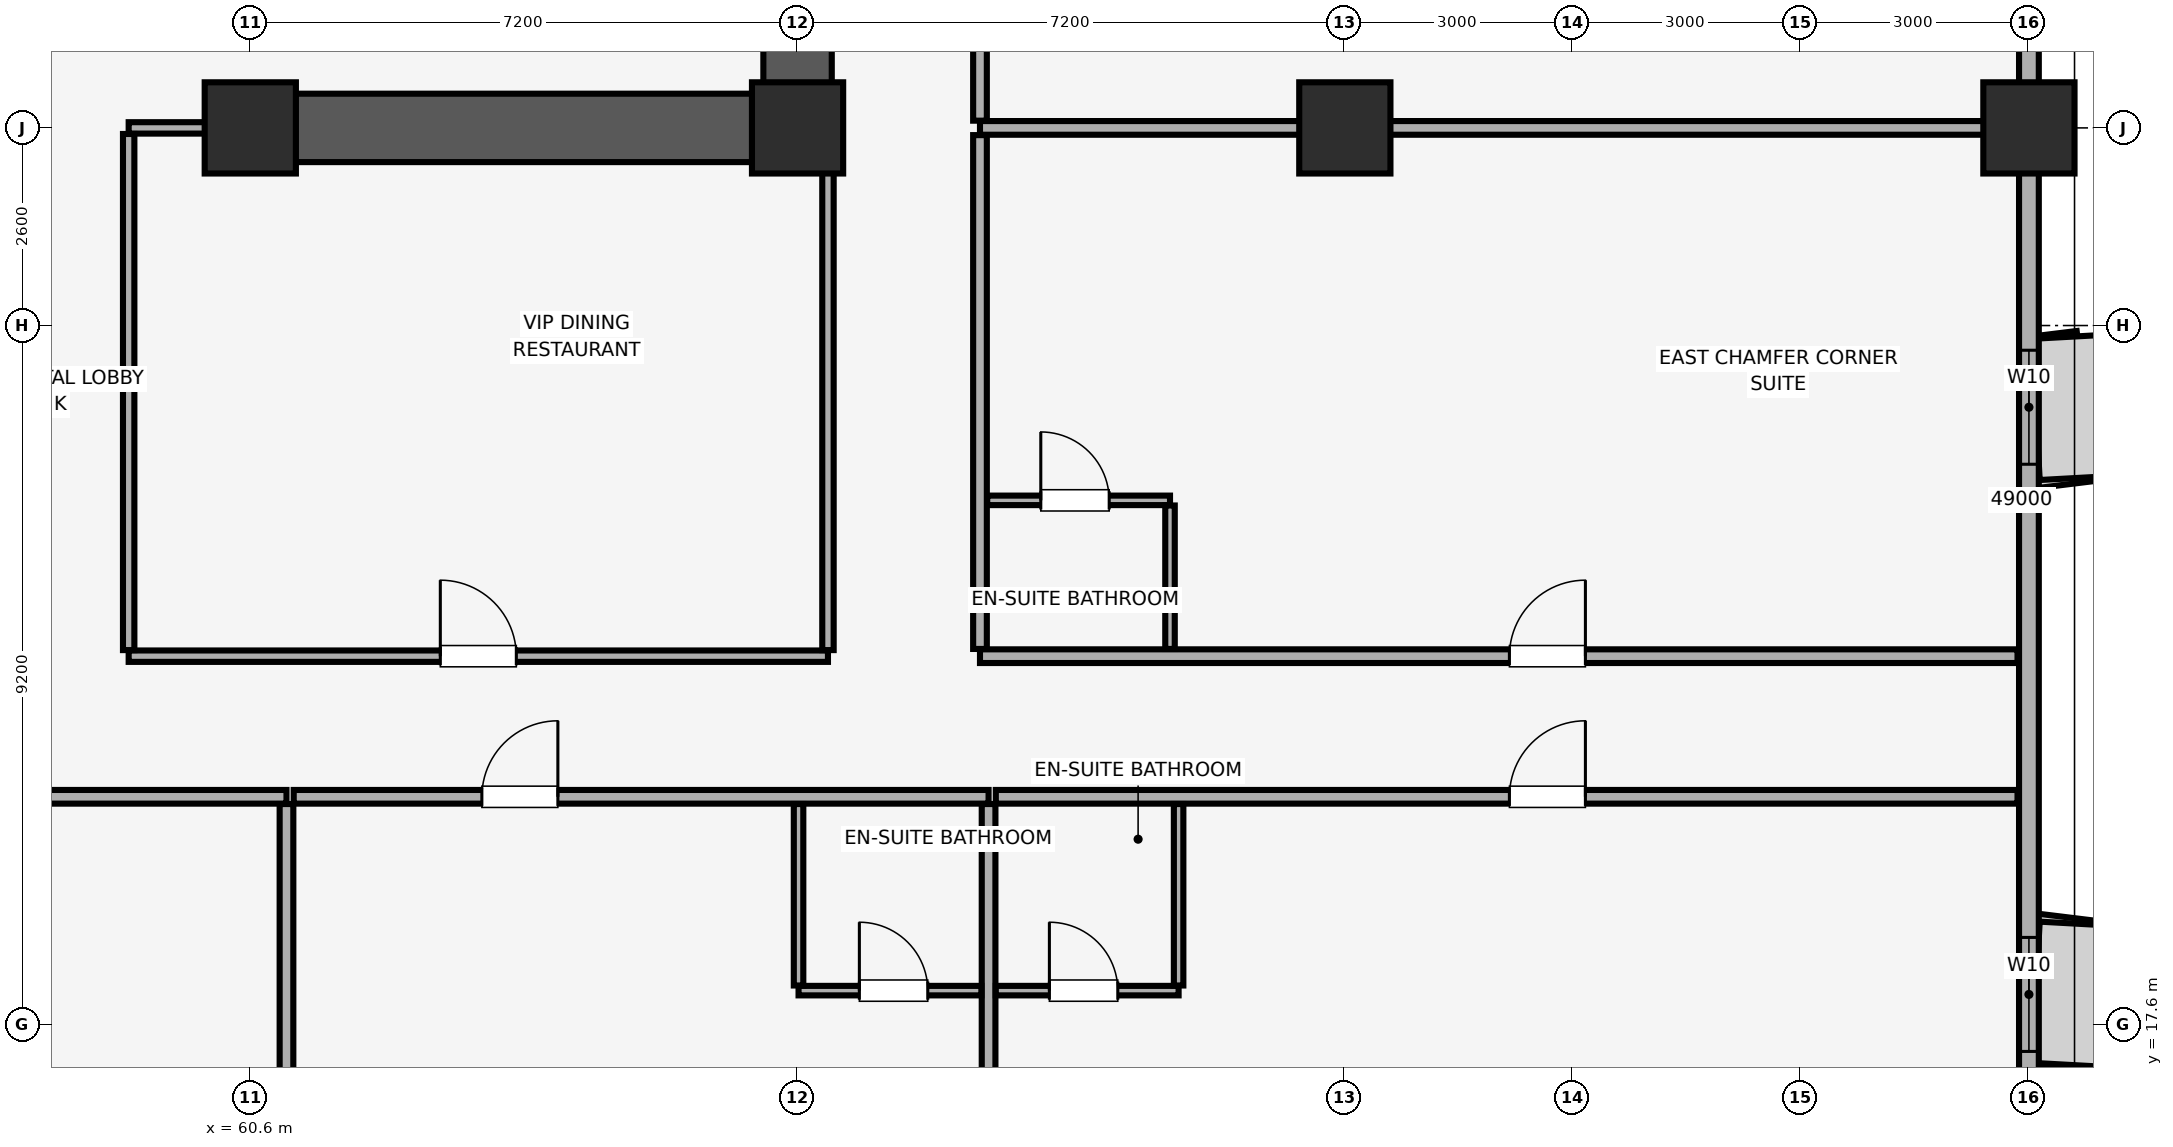
"""IFC4 building model, lengths in metres.
Left out: names, types, materials, properties, quantities, classifications, styles, units other than length and angle.
Written with IfcOpenShell. Run it as: python <this file> out.ifc"""

import sys

from ifc_helpers import new_model, si_unit, direction, frame, frame_2d, origin, origin_2d, place, context, subcontext, project, spatial, rectangle, extrude, element, fill, save


model = new_model("IFC4")
c1 = context("Model", 3, precision=1e-05, world=origin(), true_north=direction((0.0, 1.0)))
c2 = subcontext(c1, "Body", "Model", "MODEL_VIEW")
j1 = project(units=[si_unit("LENGTHUNIT", "METRE"), si_unit("PLANEANGLEUNIT", "RADIAN")], contexts=[c1])
p1 = place(None, origin())
s1 = spatial("IfcSite", under=j1, at=p1, CompositionType="ELEMENT")
p2 = place(p1, origin())
s2 = spatial("IfcBuilding", under=s1, at=p2, CompositionType="ELEMENT")
p3 = place(p2, frame((0.0, 0.0, 93.05)))
s3 = spatial("IfcBuildingStorey", under=s2, at=p3, CompositionType="ELEMENT", Elevation=93.05)
for number, where, z_axis, x_axis in (
    (1, (84.0, 29.4, 0.0), (0.0, 0.0, 1.0), (1.0, 0.0, 0.0)),
    (2, (60.6, 29.4, 0.0), (0.0, 0.0, 1.0), (1.0, 0.0, 0.0)),
    (3, (67.8, 29.4, 0.0), (0.0, 0.0, 1.0), (1.0, 0.0, 0.0)),
    (4, (75.0, 29.4, 0.0), (0.0, 0.0, 1.0), (1.0, 0.0, 0.0)),
):
    element("IfcColumn", number, at=place(p3, frame(where, z_axis=z_axis, x_axis=x_axis)), inside=s3, PredefinedType="COLUMN", context=c2, shape_type="SweptSolid", body=[
        extrude(rectangle(XDim=1.2, YDim=1.2, at=origin_2d()), origin(), (0.0, 0.0, 1.0), 3.51),
    ])
p4 = place(p3, frame((84.0, 4.2, 0.0), z_axis=(0.0, 0.0, 1.0), x_axis=(0.0, 1.0, 0.0)))
e5 = element("IfcWall", 5, at=p4, inside=s3, PredefinedType="SOLIDWALL", context=c2, shape_type="SweptSolid", body=[
    extrude(rectangle(XDim=40.6, YDim=0.26, at=frame_2d((20.3, 0.0))), origin(), (0.0, 0.0, 1.0), 2.56),
])
p5 = place(p4, frame((6.05, 0.0, 0.85)))
e6 = element("IfcOpeningElement", 6, at=p5, cuts=e5, PredefinedType="OPENING", context=c2, shape_type="SweptSolid", body=[
    extrude(rectangle(XDim=1.5, YDim=1.4, at=frame_2d((0.75, 0.7))), frame((0.0, 0.14, 0.0), z_axis=(0.0, -1.0, 0.0), x_axis=(1.0, 0.0, 0.0)), (0.0, 0.0, 1.0), 0.28),
])
p6 = place(p4, frame((13.05, 0.0, 0.85)))
e7 = element("IfcOpeningElement", 7, at=p6, cuts=e5, PredefinedType="OPENING", context=c2, shape_type="SweptSolid", body=[
    extrude(rectangle(XDim=1.5, YDim=1.4, at=frame_2d((0.75, 0.7))), frame((0.0, 0.14, 0.0), z_axis=(0.0, -1.0, 0.0), x_axis=(1.0, 0.0, 0.0)), (0.0, 0.0, 1.0), 0.28),
])
p7 = place(p4, frame((20.775, 0.0, 0.85)))
e8 = element("IfcOpeningElement", 8, at=p7, cuts=e5, PredefinedType="OPENING", context=c2, shape_type="SweptSolid", body=[
    extrude(rectangle(XDim=1.5, YDim=1.4, at=frame_2d((0.75, 0.7))), frame((0.0, 0.14, 0.0), z_axis=(0.0, -1.0, 0.0), x_axis=(1.0, 0.0, 0.0)), (0.0, 0.0, 1.0), 0.28),
])
p8 = place(p4, frame((27.165, 0.0, 0.85)))
e9 = element("IfcOpeningElement", 9, at=p8, cuts=e5, PredefinedType="OPENING", context=c2, shape_type="SweptSolid", body=[
    extrude(rectangle(XDim=1.5, YDim=1.4, at=frame_2d((0.75, 0.7))), frame((0.0, 0.14, 0.0), z_axis=(0.0, -1.0, 0.0), x_axis=(1.0, 0.0, 0.0)), (0.0, 0.0, 1.0), 0.28),
])
p9 = place(p4, frame((31.935, 0.0, 0.85)))
e10 = element("IfcOpeningElement", 10, at=p9, cuts=e5, PredefinedType="OPENING", context=c2, shape_type="SweptSolid", body=[
    extrude(rectangle(XDim=1.5, YDim=1.4, at=frame_2d((0.75, 0.7))), frame((0.0, 0.14, 0.0), z_axis=(0.0, -1.0, 0.0), x_axis=(1.0, 0.0, 0.0)), (0.0, 0.0, 1.0), 0.28),
])
p10 = place(p4, frame((37.365, 0.0, 0.85)))
e11 = element("IfcOpeningElement", 11, at=p10, cuts=e5, PredefinedType="OPENING", context=c2, shape_type="SweptSolid", body=[
    extrude(rectangle(XDim=1.5, YDim=1.4, at=frame_2d((0.75, 0.7))), frame((0.0, 0.14, 0.0), z_axis=(0.0, -1.0, 0.0), x_axis=(1.0, 0.0, 0.0)), (0.0, 0.0, 1.0), 0.28),
])
p11 = place(p3, frame((67.8, 29.4, 0.0), z_axis=(0.0, 0.0, 1.0), x_axis=(0.0, 1.0, 0.0)))
e12 = element("IfcWall", 12, at=p11, inside=s3, PredefinedType="SHEAR", context=c2, shape_type="SweptSolid", body=[
    extrude(rectangle(XDim=19.2, YDim=0.9, at=frame_2d((9.6, 0.0))), origin(), (0.0, 0.0, 1.0), 3.51),
])
p12 = place(p3, frame((60.4, 29.4, 0.0), z_axis=(0.0, 0.0, 1.0), x_axis=(1.0, 0.0, 0.0)))
e13 = element("IfcWall", 13, at=p12, inside=s3, PredefinedType="SHEAR", context=c2, shape_type="SweptSolid", body=[
    extrude(rectangle(XDim=6.945, YDim=0.9, at=frame_2d((3.473, 0.0))), origin(), (0.0, 0.0, 1.0), 3.51),
])
p13 = place(p3, frame((51.733, 20.6, 0.0), z_axis=(0.0, 0.0, 1.0), x_axis=(1.0, 0.0, 0.0)))
e14 = element("IfcWall", 14, at=p13, inside=s3, PredefinedType="PARTITIONING", context=c2, shape_type="SweptSolid", body=[
    extrude(rectangle(XDim=9.343, YDim=0.18, at=frame_2d((4.671, 0.0))), origin(), (0.0, 0.0, 1.0), 3.51),
])
p14 = place(p13, frame((5.196, 0.0, 0.0)))
e15 = element("IfcOpeningElement", 15, at=p14, cuts=e14, PredefinedType="OPENING", context=c2, shape_type="SweptSolid", body=[
    extrude(rectangle(XDim=1.0, YDim=2.15, at=frame_2d((0.5, 1.075))), frame((0.0, 0.1, 0.0), z_axis=(0.0, -1.0, 0.0), x_axis=(1.0, 0.0, 0.0)), (0.0, 0.0, 1.0), 0.2),
])
p15 = place(p3, frame((61.076, 0.15, 0.0), z_axis=(0.0, 0.0, 1.0), x_axis=(0.0, 1.0, 0.0)))
e16 = element("IfcWall", 16, at=p15, inside=s3, PredefinedType="PARTITIONING", context=c2, shape_type="SweptSolid", body=[
    extrude(rectangle(XDim=20.355, YDim=0.18, at=frame_2d((10.177, 0.0))), origin(), (0.0, 0.0, 1.0), 3.51),
])
p16 = place(p3, frame((61.171, 20.6, 0.0), z_axis=(0.0, 0.0, 1.0), x_axis=(1.0, 0.0, 0.0)))
e17 = element("IfcWall", 17, at=p16, inside=s3, PredefinedType="PARTITIONING", context=c2, shape_type="SweptSolid", body=[
    extrude(rectangle(XDim=9.142, YDim=0.18, at=frame_2d((4.571, 0.0))), origin(), (0.0, 0.0, 1.0), 3.51),
])
p17 = place(p16, frame((2.475, 0.0, 0.0)))
e18 = element("IfcOpeningElement", 18, at=p17, cuts=e17, PredefinedType="OPENING", context=c2, shape_type="SweptSolid", body=[
    extrude(rectangle(XDim=1.0, YDim=2.15, at=frame_2d((0.5, 1.075))), frame((0.0, 0.1, 0.0), z_axis=(0.0, -1.0, 0.0), x_axis=(1.0, 0.0, 0.0)), (0.0, 0.0, 1.0), 0.2),
])
p18 = place(p3, frame((70.313, 0.15, 0.0), z_axis=(0.0, 0.0, 1.0), x_axis=(0.0, 1.0, 0.0)))
e19 = element("IfcWall", 19, at=p18, inside=s3, PredefinedType="PARTITIONING", context=c2, shape_type="SweptSolid", body=[
    extrude(rectangle(XDim=20.355, YDim=0.18, at=frame_2d((10.177, 0.0))), origin(), (0.0, 0.0, 1.0), 3.51),
])
p19 = place(p3, frame((67.813, 18.05, 0.0), z_axis=(0.0, 0.0, 1.0), x_axis=(1.0, 0.0, 0.0)))
e20 = element("IfcWall", 20, at=p19, inside=s3, PredefinedType="PARTITIONING", context=c2, shape_type="SweptSolid", body=[
    extrude(rectangle(XDim=2.405, YDim=0.125, at=frame_2d((1.203, 0.0))), origin(), (0.0, 0.0, 1.0), 3.51),
])
p20 = place(p19, frame((0.8, 0.0, 0.0)))
e21 = element("IfcOpeningElement", 21, at=p20, cuts=e20, PredefinedType="OPENING", context=c2, shape_type="SweptSolid", body=[
    extrude(rectangle(XDim=0.9, YDim=2.1, at=frame_2d((0.45, 1.05))), frame((0.0, 0.073, 0.0), z_axis=(0.0, -1.0, 0.0), x_axis=(1.0, 0.0, 0.0)), (0.0, 0.0, 1.0), 0.145),
])
p21 = place(p3, frame((67.813, 18.117, 0.0), z_axis=(0.0, 0.0, 1.0), x_axis=(0.0, 1.0, 0.0)))
e22 = element("IfcWall", 22, at=p21, inside=s3, PredefinedType="PARTITIONING", context=c2, shape_type="SweptSolid", body=[
    extrude(rectangle(XDim=2.387, YDim=0.125, at=frame_2d((1.194, 0.0))), origin(), (0.0, 0.0, 1.0), 2.977),
])
p22 = place(p3, frame((70.408, 20.6, 0.0), z_axis=(0.0, 0.0, 1.0), x_axis=(1.0, 0.0, 0.0)))
e23 = element("IfcWall", 23, at=p22, inside=s3, PredefinedType="PARTITIONING", context=c2, shape_type="SweptSolid", body=[
    extrude(rectangle(XDim=13.442, YDim=0.18, at=frame_2d((6.721, 0.0))), origin(), (0.0, 0.0, 1.0), 3.51),
])
p23 = place(p22, frame((6.757, 0.0, 0.0)))
e24 = element("IfcOpeningElement", 24, at=p23, cuts=e23, PredefinedType="OPENING", context=c2, shape_type="SweptSolid", body=[
    extrude(rectangle(XDim=1.0, YDim=2.15, at=frame_2d((0.5, 1.075))), frame((0.0, 0.1, 0.0), z_axis=(0.0, -1.0, 0.0), x_axis=(1.0, 0.0, 0.0)), (0.0, 0.0, 1.0), 0.2),
])
p24 = place(p3, frame((70.408, 18.05, 0.0), z_axis=(0.0, 0.0, 1.0), x_axis=(1.0, 0.0, 0.0)))
e25 = element("IfcWall", 25, at=p24, inside=s3, PredefinedType="PARTITIONING", context=c2, shape_type="SweptSolid", body=[
    extrude(rectangle(XDim=2.405, YDim=0.125, at=frame_2d((1.202, 0.0))), origin(), (0.0, 0.0, 1.0), 3.51),
])
p25 = place(p24, frame((0.705, 0.0, 0.0)))
e26 = element("IfcOpeningElement", 26, at=p25, cuts=e25, PredefinedType="OPENING", context=c2, shape_type="SweptSolid", body=[
    extrude(rectangle(XDim=0.9, YDim=2.1, at=frame_2d((0.45, 1.05))), frame((0.0, 0.073, 0.0), z_axis=(0.0, -1.0, 0.0), x_axis=(1.0, 0.0, 0.0)), (0.0, 0.0, 1.0), 0.145),
])
p26 = place(p3, frame((72.813, 18.117, 0.0), z_axis=(0.0, 0.0, 1.0), x_axis=(0.0, 1.0, 0.0)))
e27 = element("IfcWall", 27, at=p26, inside=s3, PredefinedType="PARTITIONING", context=c2, shape_type="SweptSolid", body=[
    extrude(rectangle(XDim=2.387, YDim=0.125, at=frame_2d((1.194, 0.0))), origin(), (0.0, 0.0, 1.0), 3.51),
])
p27 = place(p3, frame((59.0, 22.45, 0.0), z_axis=(0.0, 0.0, 1.0), x_axis=(1.0, 0.0, 0.0)))
e28 = element("IfcWall", 28, at=p27, inside=s3, PredefinedType="PARTITIONING", context=c2, shape_type="SweptSolid", body=[
    extrude(rectangle(XDim=9.2, YDim=0.15, at=frame_2d((4.6, 0.0))), origin(), (0.0, 0.0, 1.0), 3.51),
])
p28 = place(p27, frame((4.1, 0.0, 0.0)))
e29 = element("IfcOpeningElement", 29, at=p28, cuts=e28, PredefinedType="OPENING", context=c2, shape_type="SweptSolid", body=[
    extrude(rectangle(XDim=1.0, YDim=2.15, at=frame_2d((0.5, 1.075))), frame((0.0, 0.085, 0.0), z_axis=(0.0, -1.0, 0.0), x_axis=(1.0, 0.0, 0.0)), (0.0, 0.0, 1.0), 0.17),
])
p29 = place(p3, frame((59.0, 29.4, 0.0), z_axis=(0.0, 0.0, 1.0), x_axis=(1.0, 0.0, 0.0)))
e30 = element("IfcWall", 30, at=p29, inside=s3, PredefinedType="PARTITIONING", context=c2, shape_type="SweptSolid", body=[
    extrude(rectangle(XDim=1.39, YDim=0.15, at=frame_2d((0.695, 0.0))), origin(), (0.0, 0.0, 1.0), 2.41),
])
p30 = place(p3, frame((59.0, 22.53, 0.0), z_axis=(0.0, 0.0, 1.0), x_axis=(0.0, 1.0, 0.0)))
e31 = element("IfcWall", 31, at=p30, inside=s3, PredefinedType="PARTITIONING", context=c2, shape_type="SweptSolid", body=[
    extrude(rectangle(XDim=6.79, YDim=0.15, at=frame_2d((3.395, 0.0))), origin(), (0.0, 0.0, 1.0), 3.51),
])
p31 = place(p3, frame((68.2, 22.53, 0.0), z_axis=(0.0, 0.0, 1.0), x_axis=(0.0, 1.0, 0.0)))
e32 = element("IfcWall", 32, at=p31, inside=s3, PredefinedType="PARTITIONING", context=c2, shape_type="SweptSolid", body=[
    extrude(rectangle(XDim=6.86, YDim=0.15, at=frame_2d((3.43, 0.0))), origin(), (0.0, 0.0, 1.0), 3.51),
])
p32 = place(p3, frame((70.2, 22.45, 0.0), z_axis=(0.0, 0.0, 1.0), x_axis=(1.0, 0.0, 0.0)))
e33 = element("IfcWall", 33, at=p32, inside=s3, PredefinedType="PARTITIONING", context=c2, shape_type="SweptSolid", body=[
    extrude(rectangle(XDim=13.65, YDim=0.18, at=frame_2d((6.825, 0.0))), origin(), (0.0, 0.0, 1.0), 3.51),
])
p33 = place(p32, frame((6.965, 0.0, 0.0)))
e34 = element("IfcOpeningElement", 34, at=p33, cuts=e33, PredefinedType="OPENING", context=c2, shape_type="SweptSolid", body=[
    extrude(rectangle(XDim=1.0, YDim=2.15, at=frame_2d((0.5, 1.075))), frame((0.0, 0.1, 0.0), z_axis=(0.0, -1.0, 0.0), x_axis=(1.0, 0.0, 0.0)), (0.0, 0.0, 1.0), 0.2),
])
p34 = place(p3, frame((70.2, 29.4, 0.0), z_axis=(0.0, 0.0, 1.0), x_axis=(1.0, 0.0, 0.0)))
e35 = element("IfcWall", 35, at=p34, inside=s3, PredefinedType="PARTITIONING", context=c2, shape_type="SweptSolid", body=[
    extrude(rectangle(XDim=13.65, YDim=0.18, at=frame_2d((6.825, 0.0))), origin(), (0.0, 0.0, 1.0), 2.86),
])
p35 = place(p3, frame((70.2, 22.545, 0.0), z_axis=(0.0, 0.0, 1.0), x_axis=(0.0, 1.0, 0.0)))
e36 = element("IfcWall", 36, at=p35, inside=s3, PredefinedType="PARTITIONING", context=c2, shape_type="SweptSolid", body=[
    extrude(rectangle(XDim=6.76, YDim=0.18, at=frame_2d((3.38, 0.0))), origin(), (0.0, 0.0, 1.0), 3.51),
])
p36 = place(p3, frame((70.295, 24.5, 0.0), z_axis=(0.0, 0.0, 1.0), x_axis=(1.0, 0.0, 0.0)))
e37 = element("IfcWall", 37, at=p36, inside=s3, PredefinedType="PARTITIONING", context=c2, shape_type="SweptSolid", body=[
    extrude(rectangle(XDim=2.405, YDim=0.125, at=frame_2d((1.203, 0.0))), origin(), (0.0, 0.0, 1.0), 3.51),
])
p37 = place(p36, frame((0.705, 0.0, 0.0)))
e38 = element("IfcOpeningElement", 38, at=p37, cuts=e37, PredefinedType="OPENING", context=c2, shape_type="SweptSolid", body=[
    extrude(rectangle(XDim=0.9, YDim=2.1, at=frame_2d((0.45, 1.05))), frame((0.0, 0.073, 0.0), z_axis=(0.0, -1.0, 0.0), x_axis=(1.0, 0.0, 0.0)), (0.0, 0.0, 1.0), 0.145),
])
p38 = place(p3, frame((72.7, 22.545, 0.0), z_axis=(0.0, 0.0, 1.0), x_axis=(0.0, 1.0, 0.0)))
e39 = element("IfcWall", 39, at=p38, inside=s3, PredefinedType="PARTITIONING", context=c2, shape_type="SweptSolid", body=[
    extrude(rectangle(XDim=1.888, YDim=0.125, at=frame_2d((0.944, 0.0))), origin(), (0.0, 0.0, 1.0), 3.51),
])
p39 = place(p3, frame((70.2, 29.495, 0.0), z_axis=(0.0, 0.0, 1.0), x_axis=(0.0, 1.0, 0.0)))
e40 = element("IfcWall", 40, at=p39, inside=s3, PredefinedType="PARTITIONING", context=c2, shape_type="SweptSolid", body=[
    extrude(rectangle(XDim=19.355, YDim=0.18, at=frame_2d((9.677, 0.0))), origin(), (0.0, 0.0, 1.0), 3.51),
])
p40 = place(p39, frame((4.505, 0.0, 0.0)))
e41 = element("IfcOpeningElement", 41, at=p40, cuts=e40, PredefinedType="OPENING", context=c2, shape_type="SweptSolid", body=[
    extrude(rectangle(XDim=1.0, YDim=2.15, at=frame_2d((0.5, 1.075))), frame((0.0, 0.1, 0.0), z_axis=(0.0, -1.0, 0.0), x_axis=(1.0, 0.0, 0.0)), (0.0, 0.0, 1.0), 0.2),
])
p41 = place(p6, origin())
e42 = element("IfcWindow", 42, at=p41, inside=s3, PartitioningType="SINGLE_PANEL", PredefinedType="WINDOW", context=c2, shape_type="SweptSolid", body=[
    extrude(rectangle(XDim=1.5, YDim=1.4, at=frame_2d((0.75, 0.7))), frame((0.0, 0.03, 0.0), z_axis=(0.0, -1.0, 0.0), x_axis=(1.0, 0.0, 0.0)), (0.0, 0.0, 1.0), 0.06),
])
fill(e7, e42)
p42 = place(p7, origin())
e43 = element("IfcWindow", 43, at=p42, inside=s3, PartitioningType="SINGLE_PANEL", PredefinedType="WINDOW", context=c2, shape_type="SweptSolid", body=[
    extrude(rectangle(XDim=1.5, YDim=1.4, at=frame_2d((0.75, 0.7))), frame((0.0, 0.03, 0.0), z_axis=(0.0, -1.0, 0.0), x_axis=(1.0, 0.0, 0.0)), (0.0, 0.0, 1.0), 0.06),
])
fill(e8, e43)
p43 = place(p17, origin())
e44 = element("IfcDoor", 44, at=p43, inside=s3, OperationType="SINGLE_SWING_RIGHT", PredefinedType="DOOR", context=c2, shape_type="SweptSolid", body=[
    extrude(rectangle(XDim=1.0, YDim=2.15, at=frame_2d((0.5, 1.075))), frame((0.0, 0.025, 0.0), z_axis=(0.0, -1.0, 0.0), x_axis=(1.0, 0.0, 0.0)), (0.0, 0.0, 1.0), 0.05),
])
fill(e18, e44)
p44 = place(p20, origin())
e45 = element("IfcDoor", 45, at=p44, inside=s3, OperationType="SINGLE_SWING_LEFT", PredefinedType="DOOR", context=c2, shape_type="SweptSolid", body=[
    extrude(rectangle(XDim=0.9, YDim=2.1, at=frame_2d((0.45, 1.05))), frame((0.0, 0.025, 0.0), z_axis=(0.0, -1.0, 0.0), x_axis=(1.0, 0.0, 0.0)), (0.0, 0.0, 1.0), 0.05),
])
fill(e21, e45)
p45 = place(p23, origin())
e46 = element("IfcDoor", 46, at=p45, inside=s3, OperationType="SINGLE_SWING_RIGHT", PredefinedType="DOOR", context=c2, shape_type="SweptSolid", body=[
    extrude(rectangle(XDim=1.0, YDim=2.15, at=frame_2d((0.5, 1.075))), frame((0.0, 0.025, 0.0), z_axis=(0.0, -1.0, 0.0), x_axis=(1.0, 0.0, 0.0)), (0.0, 0.0, 1.0), 0.05),
])
fill(e24, e46)
p46 = place(p25, origin())
e47 = element("IfcDoor", 47, at=p46, inside=s3, OperationType="SINGLE_SWING_LEFT", PredefinedType="DOOR", context=c2, shape_type="SweptSolid", body=[
    extrude(rectangle(XDim=0.9, YDim=2.1, at=frame_2d((0.45, 1.05))), frame((0.0, 0.025, 0.0), z_axis=(0.0, -1.0, 0.0), x_axis=(1.0, 0.0, 0.0)), (0.0, 0.0, 1.0), 0.05),
])
fill(e26, e47)
p47 = place(p28, origin())
e48 = element("IfcDoor", 48, at=p47, inside=s3, OperationType="SINGLE_SWING_LEFT", PredefinedType="DOOR", context=c2, shape_type="SweptSolid", body=[
    extrude(rectangle(XDim=1.0, YDim=2.15, at=frame_2d((0.5, 1.075))), frame((0.0, 0.025, 0.0), z_axis=(0.0, -1.0, 0.0), x_axis=(1.0, 0.0, 0.0)), (0.0, 0.0, 1.0), 0.05),
])
fill(e29, e48)
p48 = place(p33, origin())
e49 = element("IfcDoor", 49, at=p48, inside=s3, OperationType="SINGLE_SWING_RIGHT", PredefinedType="DOOR", context=c2, shape_type="SweptSolid", body=[
    extrude(rectangle(XDim=1.0, YDim=2.15, at=frame_2d((0.5, 1.075))), frame((0.0, 0.025, 0.0), z_axis=(0.0, -1.0, 0.0), x_axis=(1.0, 0.0, 0.0)), (0.0, 0.0, 1.0), 0.05),
])
fill(e34, e49)
p49 = place(p37, origin())
e50 = element("IfcDoor", 50, at=p49, inside=s3, OperationType="SINGLE_SWING_LEFT", PredefinedType="DOOR", context=c2, shape_type="SweptSolid", body=[
    extrude(rectangle(XDim=0.9, YDim=2.1, at=frame_2d((0.45, 1.05))), frame((0.0, 0.025, 0.0), z_axis=(0.0, -1.0, 0.0), x_axis=(1.0, 0.0, 0.0)), (0.0, 0.0, 1.0), 0.05),
])
fill(e38, e50)
save(model, sys.argv[1])
